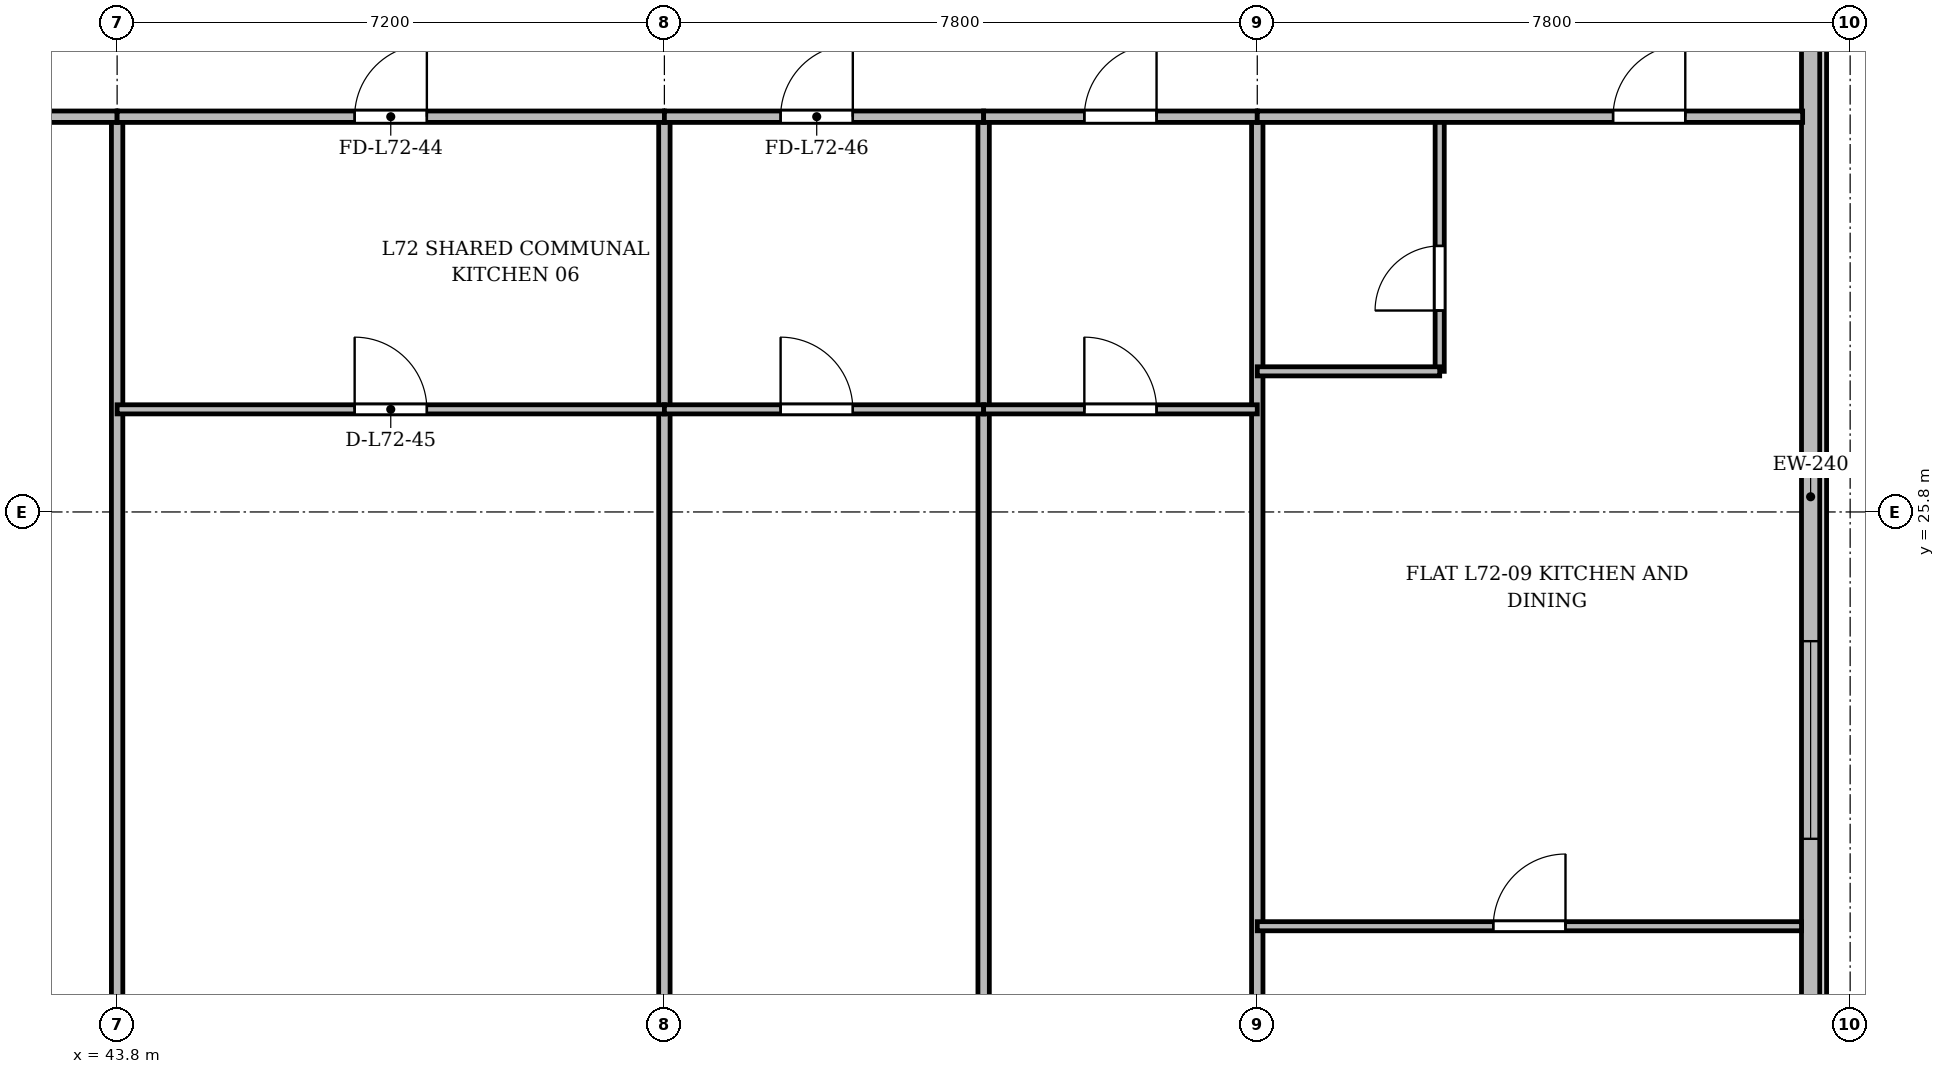
"""IFC4 building model, lengths in metres.
Left out: names, types, materials, properties, quantities, classifications, styles, units other than length and angle.
Written with IfcOpenShell. Run it as: python <this file> out.ifc"""

import sys

from ifc_helpers import new_model, si_unit, direction, frame, frame_2d, origin, place, context, subcontext, project, spatial, rectangle, extrude, source, transform, mapped, element, fill, save


model = new_model("IFC4")
c1 = context("Model", 3, precision=1e-05, world=origin(), true_north=direction((0.0, 1.0)))
c2 = subcontext(c1, "Body", "Model", "MODEL_VIEW")
j1 = project(units=[si_unit("LENGTHUNIT", "METRE"), si_unit("PLANEANGLEUNIT", "RADIAN")], contexts=[c1])
p1 = place(None, origin())
s1 = spatial("IfcSite", under=j1, at=p1, CompositionType="ELEMENT")
p2 = place(p1, origin())
s2 = spatial("IfcBuilding", under=s1, at=p2, CompositionType="ELEMENT")
p3 = place(p2, frame((0.0, 0.0, 277.5)))
s3 = spatial("IfcBuildingStorey", under=s2, at=p3, CompositionType="ELEMENT", Elevation=277.5)
p4 = place(p3, frame((66.08, 45.5, 0.0), z_axis=(0.0, 0.0, 1.0), x_axis=(0.0, -1.0, 0.0)))
e1 = element("IfcWall", 1, at=p4, inside=s3, PredefinedType="SOLIDWALL", context=c2, shape_type="SweptSolid", body=[
    extrude(rectangle(XDim=39.0, YDim=0.24, at=frame_2d((19.5, 0.0))), origin(), (0.0, 0.0, 1.0), 3.37),
])
p5 = place(p4, frame((36.35, 0.0, 0.92)))
e2 = element("IfcOpeningElement", 2, at=p5, cuts=e1, PredefinedType="OPENING", context=c2, shape_type="SweptSolid", body=[
    extrude(rectangle(XDim=1.2, YDim=1.65, at=frame_2d((0.6, 0.825))), frame((0.0, 0.13, 0.0), z_axis=(0.0, -1.0, 0.0), x_axis=(1.0, 0.0, 0.0)), (0.0, 0.0, 1.0), 0.26),
])
p6 = place(p4, frame((32.8, 0.0, 0.92)))
e3 = element("IfcOpeningElement", 3, at=p6, cuts=e1, PredefinedType="OPENING", context=c2, shape_type="SweptSolid", body=[
    extrude(rectangle(XDim=2.6, YDim=1.9, at=frame_2d((1.3, 0.95))), frame((0.0, 0.13, 0.0), z_axis=(0.0, -1.0, 0.0), x_axis=(1.0, 0.0, 0.0)), (0.0, 0.0, 1.0), 0.26),
])
p7 = place(p4, frame((28.6, 0.0, 0.92)))
e4 = element("IfcOpeningElement", 4, at=p7, cuts=e1, PredefinedType="OPENING", context=c2, shape_type="SweptSolid", body=[
    extrude(rectangle(XDim=2.6, YDim=1.9, at=frame_2d((1.3, 0.95))), frame((0.0, 0.13, 0.0), z_axis=(0.0, -1.0, 0.0), x_axis=(1.0, 0.0, 0.0)), (0.0, 0.0, 1.0), 0.26),
])
p8 = place(p4, frame((21.4, 0.0, 0.92)))
e5 = element("IfcOpeningElement", 5, at=p8, cuts=e1, PredefinedType="OPENING", context=c2, shape_type="SweptSolid", body=[
    extrude(rectangle(XDim=2.6, YDim=1.9, at=frame_2d((1.3, 0.95))), frame((0.0, 0.13, 0.0), z_axis=(0.0, -1.0, 0.0), x_axis=(1.0, 0.0, 0.0)), (0.0, 0.0, 1.0), 0.26),
])
p9 = place(p4, frame((7.4, 0.0, 0.92)))
e6 = element("IfcOpeningElement", 6, at=p9, cuts=e1, PredefinedType="OPENING", context=c2, shape_type="SweptSolid", body=[
    extrude(rectangle(XDim=2.6, YDim=1.9, at=frame_2d((1.3, 0.95))), frame((0.0, 0.13, 0.0), z_axis=(0.0, -1.0, 0.0), x_axis=(1.0, 0.0, 0.0)), (0.0, 0.0, 1.0), 0.26),
])
p10 = place(p4, frame((4.5, 0.0, 0.92)))
e7 = element("IfcOpeningElement", 7, at=p10, cuts=e1, PredefinedType="OPENING", context=c2, shape_type="SweptSolid", body=[
    extrude(rectangle(XDim=1.2, YDim=1.65, at=frame_2d((0.6, 0.825))), frame((0.0, 0.13, 0.0), z_axis=(0.0, -1.0, 0.0), x_axis=(1.0, 0.0, 0.0)), (0.0, 0.0, 1.0), 0.26),
])
p11 = place(p4, frame((1.15, 0.0, 0.92)))
e8 = element("IfcOpeningElement", 8, at=p11, cuts=e1, PredefinedType="OPENING", context=c2, shape_type="SweptSolid", body=[
    extrude(rectangle(XDim=1.2, YDim=1.65, at=frame_2d((0.6, 0.825))), frame((0.0, 0.13, 0.0), z_axis=(0.0, -1.0, 0.0), x_axis=(1.0, 0.0, 0.0)), (0.0, 0.0, 1.0), 0.26),
])
for number, where, z_axis, x_axis in (
    (9, (43.8, 3.725, 0.0), (0.0, 0.0, 1.0), (0.0, 1.0, 0.0)),
    (10, (51.0, 3.725, 0.0), (0.0, 0.0, 1.0), (0.0, 1.0, 0.0)),
):
    element("IfcWall", number, at=place(p3, frame(where, z_axis=z_axis, x_axis=x_axis)), inside=s3, PredefinedType="PARTITIONING", context=c2, shape_type="SweptSolid", body=[
        extrude(rectangle(XDim=27.275, YDim=0.15, at=frame_2d((13.637, 0.0))), origin(), (0.0, 0.0, 1.0), 2.87),
    ])
p12 = place(p3, frame((55.2, 3.725, 0.0), z_axis=(0.0, 0.0, 1.0), x_axis=(0.0, 1.0, 0.0)))
e11 = element("IfcWall", 11, at=p12, inside=s3, PredefinedType="PARTITIONING", context=c2, shape_type="SweptSolid", body=[
    extrude(rectangle(XDim=27.275, YDim=0.15, at=frame_2d((13.637, 0.0))), origin(), (0.0, 0.0, 1.0), 2.92),
])
p13 = place(p3, frame((58.8, 3.725, 0.0), z_axis=(0.0, 0.0, 1.0), x_axis=(0.0, 1.0, 0.0)))
e12 = element("IfcWall", 12, at=p13, inside=s3, PredefinedType="PARTITIONING", context=c2, shape_type="SweptSolid", body=[
    extrude(rectangle(XDim=27.275, YDim=0.15, at=frame_2d((13.637, 0.0))), origin(), (0.0, 0.0, 1.0), 2.87),
])
p14 = place(p3, frame((30.6, 31.0, 0.0), z_axis=(0.0, 0.0, 1.0), x_axis=(1.0, 0.0, 0.0)))
e13 = element("IfcWall", 13, at=p14, inside=s3, PredefinedType="PARTITIONING", context=c2, shape_type="SweptSolid", body=[
    extrude(rectangle(XDim=13.2, YDim=0.15, at=frame_2d((6.6, 0.0))), origin(), (0.0, 0.0, 1.0), 2.87),
])
p15 = place(p14, frame((5.8, 0.0, 0.0)))
e14 = element("IfcOpeningElement", 14, at=p15, cuts=e13, PredefinedType="OPENING", context=c2, shape_type="SweptSolid", body=[
    extrude(rectangle(XDim=1.6, YDim=2.2, at=frame_2d((0.8, 1.1))), frame((0.0, 0.085, 0.0), z_axis=(0.0, -1.0, 0.0), x_axis=(1.0, 0.0, 0.0)), (0.0, 0.0, 1.0), 0.17),
])
p16 = place(p3, frame((43.8, 31.0, 0.0), z_axis=(0.0, 0.0, 1.0), x_axis=(1.0, 0.0, 0.0)))
e15 = element("IfcWall", 15, at=p16, inside=s3, PredefinedType="PARTITIONING", context=c2, shape_type="SweptSolid", body=[
    extrude(rectangle(XDim=7.2, YDim=0.15, at=frame_2d((3.6, 0.0))), origin(), (0.0, 0.0, 1.0), 2.87),
])
p17 = place(p16, frame((3.125, 0.0, 0.0)))
e16 = element("IfcOpeningElement", 16, at=p17, cuts=e15, PredefinedType="OPENING", context=c2, shape_type="SweptSolid", body=[
    extrude(rectangle(XDim=0.95, YDim=2.15, at=frame_2d((0.475, 1.075))), frame((0.0, 0.085, 0.0), z_axis=(0.0, -1.0, 0.0), x_axis=(1.0, 0.0, 0.0)), (0.0, 0.0, 1.0), 0.17),
])
p18 = place(p3, frame((43.8, 27.15, 0.0), z_axis=(0.0, 0.0, 1.0), x_axis=(1.0, 0.0, 0.0)))
e17 = element("IfcWall", 17, at=p18, inside=s3, PredefinedType="PARTITIONING", context=c2, shape_type="SweptSolid", body=[
    extrude(rectangle(XDim=7.2, YDim=0.12, at=frame_2d((3.6, 0.0))), origin(), (0.0, 0.0, 1.0), 2.87),
])
p19 = place(p18, frame((3.125, 0.0, 0.0)))
e18 = element("IfcOpeningElement", 18, at=p19, cuts=e17, PredefinedType="OPENING", context=c2, shape_type="SweptSolid", body=[
    extrude(rectangle(XDim=0.95, YDim=2.15, at=frame_2d((0.475, 1.075))), frame((0.0, 0.07, 0.0), z_axis=(0.0, -1.0, 0.0), x_axis=(1.0, 0.0, 0.0)), (0.0, 0.0, 1.0), 0.14),
])
p20 = place(p3, frame((51.0, 31.0, 0.0), z_axis=(0.0, 0.0, 1.0), x_axis=(1.0, 0.0, 0.0)))
e19 = element("IfcWall", 19, at=p20, inside=s3, PredefinedType="PARTITIONING", context=c2, shape_type="SweptSolid", body=[
    extrude(rectangle(XDim=4.2, YDim=0.15, at=frame_2d((2.1, 0.0))), origin(), (0.0, 0.0, 1.0), 2.87),
])
p21 = place(p20, frame((1.529, 0.0, 0.0)))
e20 = element("IfcOpeningElement", 20, at=p21, cuts=e19, PredefinedType="OPENING", context=c2, shape_type="SweptSolid", body=[
    extrude(rectangle(XDim=0.95, YDim=2.15, at=frame_2d((0.475, 1.075))), frame((0.0, 0.085, 0.0), z_axis=(0.0, -1.0, 0.0), x_axis=(1.0, 0.0, 0.0)), (0.0, 0.0, 1.0), 0.17),
])
p22 = place(p3, frame((51.0, 27.15, 0.0), z_axis=(0.0, 0.0, 1.0), x_axis=(1.0, 0.0, 0.0)))
e21 = element("IfcWall", 21, at=p22, inside=s3, PredefinedType="PARTITIONING", context=c2, shape_type="SweptSolid", body=[
    extrude(rectangle(XDim=4.2, YDim=0.12, at=frame_2d((2.1, 0.0))), origin(), (0.0, 0.0, 1.0), 2.87),
])
p23 = place(p22, frame((1.529, 0.0, 0.0)))
e22 = element("IfcOpeningElement", 22, at=p23, cuts=e21, PredefinedType="OPENING", context=c2, shape_type="SweptSolid", body=[
    extrude(rectangle(XDim=0.95, YDim=2.15, at=frame_2d((0.475, 1.075))), frame((0.0, 0.07, 0.0), z_axis=(0.0, -1.0, 0.0), x_axis=(1.0, 0.0, 0.0)), (0.0, 0.0, 1.0), 0.14),
])
p24 = place(p3, frame((55.2, 31.0, 0.0), z_axis=(0.0, 0.0, 1.0), x_axis=(1.0, 0.0, 0.0)))
e23 = element("IfcWall", 23, at=p24, inside=s3, PredefinedType="PARTITIONING", context=c2, shape_type="SweptSolid", body=[
    extrude(rectangle(XDim=3.6, YDim=0.15, at=frame_2d((1.8, 0.0))), origin(), (0.0, 0.0, 1.0), 2.87),
])
p25 = place(p24, frame((1.325, 0.0, 0.0)))
e24 = element("IfcOpeningElement", 24, at=p25, cuts=e23, PredefinedType="OPENING", context=c2, shape_type="SweptSolid", body=[
    extrude(rectangle(XDim=0.95, YDim=2.15, at=frame_2d((0.475, 1.075))), frame((0.0, 0.085, 0.0), z_axis=(0.0, -1.0, 0.0), x_axis=(1.0, 0.0, 0.0)), (0.0, 0.0, 1.0), 0.17),
])
p26 = place(p3, frame((55.2, 27.15, 0.0), z_axis=(0.0, 0.0, 1.0), x_axis=(1.0, 0.0, 0.0)))
e25 = element("IfcWall", 25, at=p26, inside=s3, PredefinedType="PARTITIONING", context=c2, shape_type="SweptSolid", body=[
    extrude(rectangle(XDim=3.6, YDim=0.12, at=frame_2d((1.8, 0.0))), origin(), (0.0, 0.0, 1.0), 2.87),
])
p27 = place(p26, frame((1.325, 0.0, 0.0)))
e26 = element("IfcOpeningElement", 26, at=p27, cuts=e25, PredefinedType="OPENING", context=c2, shape_type="SweptSolid", body=[
    extrude(rectangle(XDim=0.95, YDim=2.15, at=frame_2d((0.475, 1.075))), frame((0.0, 0.07, 0.0), z_axis=(0.0, -1.0, 0.0), x_axis=(1.0, 0.0, 0.0)), (0.0, 0.0, 1.0), 0.14),
])
p28 = place(p3, frame((58.8, 20.35, 0.0), z_axis=(0.0, 0.0, 1.0), x_axis=(1.0, 0.0, 0.0)))
e27 = element("IfcWall", 27, at=p28, inside=s3, PredefinedType="PARTITIONING", context=c2, shape_type="SweptSolid", body=[
    extrude(rectangle(XDim=7.16, YDim=0.12, at=frame_2d((3.58, 0.0))), origin(), (0.0, 0.0, 1.0), 2.87),
])
p29 = place(p28, frame((3.105, 0.0, 0.0)))
e28 = element("IfcOpeningElement", 28, at=p29, cuts=e27, PredefinedType="OPENING", context=c2, shape_type="SweptSolid", body=[
    extrude(rectangle(XDim=0.95, YDim=2.15, at=frame_2d((0.475, 1.075))), frame((0.0, 0.07, 0.0), z_axis=(0.0, -1.0, 0.0), x_axis=(1.0, 0.0, 0.0)), (0.0, 0.0, 1.0), 0.14),
])
p30 = place(p3, frame((61.2, 27.65, 0.0), z_axis=(0.0, 0.0, 1.0), x_axis=(0.0, 1.0, 0.0)))
e29 = element("IfcWall", 29, at=p30, inside=s3, PredefinedType="PARTITIONING", context=c2, shape_type="SweptSolid", body=[
    extrude(rectangle(XDim=3.35, YDim=0.12, at=frame_2d((1.675, 0.0))), origin(), (0.0, 0.0, 1.0), 3.37),
])
p31 = place(p30, frame((0.8, 0.0, 0.0)))
e30 = element("IfcOpeningElement", 30, at=p31, cuts=e29, PredefinedType="OPENING", context=c2, shape_type="SweptSolid", body=[
    extrude(rectangle(XDim=0.85, YDim=2.1, at=frame_2d((0.425, 1.05))), frame((0.0, 0.07, 0.0), z_axis=(0.0, -1.0, 0.0), x_axis=(1.0, 0.0, 0.0)), (0.0, 0.0, 1.0), 0.14),
])
p32 = place(p3, frame((58.8, 27.65, 0.0), z_axis=(0.0, 0.0, 1.0), x_axis=(1.0, 0.0, 0.0)))
e31 = element("IfcWall", 31, at=p32, inside=s3, PredefinedType="PARTITIONING", context=c2, shape_type="SweptSolid", body=[
    extrude(rectangle(XDim=2.4, YDim=0.12, at=frame_2d((1.2, 0.0))), origin(), (0.0, 0.0, 1.0), 2.87),
])
p33 = place(p3, frame((58.8, 31.0, 0.0), z_axis=(0.0, 0.0, 1.0), x_axis=(1.0, 0.0, 0.0)))
e32 = element("IfcWall", 32, at=p33, inside=s3, PredefinedType="PARTITIONING", context=c2, shape_type="SweptSolid", body=[
    extrude(rectangle(XDim=7.175, YDim=0.15, at=frame_2d((3.587, 0.0))), origin(), (0.0, 0.0, 1.0), 2.87),
])
p34 = place(p33, frame((4.681, 0.0, 0.0)))
e33 = element("IfcOpeningElement", 33, at=p34, cuts=e32, PredefinedType="OPENING", context=c2, shape_type="SweptSolid", body=[
    extrude(rectangle(XDim=0.95, YDim=2.15, at=frame_2d((0.475, 1.075))), frame((0.0, 0.085, 0.0), z_axis=(0.0, -1.0, 0.0), x_axis=(1.0, 0.0, 0.0)), (0.0, 0.0, 1.0), 0.17),
])
m1 = source(origin(), c2, "Body", "SweptSolid", [
    extrude(rectangle(XDim=2.6, YDim=1.9, at=frame_2d((1.3, 0.95))), frame((0.0, 0.03, 0.0), z_axis=(0.0, -1.0, 0.0), x_axis=(1.0, 0.0, 0.0)), (0.0, 0.0, 1.0), 0.06),
])
p35 = place(p8, origin())
e34 = element("IfcWindow", 34, at=p35, inside=s3, PartitioningType="SINGLE_PANEL", PredefinedType="WINDOW", context=c2, shape_type="MappedRepresentation", body=[
    mapped(m1, transform((0.0, 0.0, 0.0), x_axis=(1.0, 0.0, 0.0), y_axis=(0.0, 1.0, 0.0), z_axis=(0.0, 0.0, 1.0), scale=1.0)),
])
fill(e5, e34)
m2 = source(origin(), c2, "Body", "SweptSolid", [
    extrude(rectangle(XDim=0.95, YDim=2.15, at=frame_2d((0.475, 1.075))), frame((0.0, 0.025, 0.0), z_axis=(0.0, -1.0, 0.0), x_axis=(1.0, 0.0, 0.0)), (0.0, 0.0, 1.0), 0.05),
])
p36 = place(p17, origin())
e35 = element("IfcDoor", 35, at=p36, inside=s3, OperationType="SINGLE_SWING_RIGHT", PredefinedType="DOOR", context=c2, shape_type="MappedRepresentation", body=[
    mapped(m2, transform((0.0, 0.0, 0.0), x_axis=(1.0, 0.0, 0.0), y_axis=(0.0, 1.0, 0.0), z_axis=(0.0, 0.0, 1.0), scale=1.0)),
])
fill(e16, e35)
p37 = place(p19, origin())
e36 = element("IfcDoor", 36, at=p37, inside=s3, OperationType="SINGLE_SWING_LEFT", PredefinedType="DOOR", context=c2, shape_type="MappedRepresentation", body=[
    mapped(m2, transform((0.0, 0.0, 0.0), x_axis=(1.0, 0.0, 0.0), y_axis=(0.0, 1.0, 0.0), z_axis=(0.0, 0.0, 1.0), scale=1.0)),
])
fill(e18, e36)
p38 = place(p21, origin())
e37 = element("IfcDoor", 37, at=p38, inside=s3, OperationType="SINGLE_SWING_RIGHT", PredefinedType="DOOR", context=c2, shape_type="MappedRepresentation", body=[
    mapped(m2, transform((0.0, 0.0, 0.0), x_axis=(1.0, 0.0, 0.0), y_axis=(0.0, 1.0, 0.0), z_axis=(0.0, 0.0, 1.0), scale=1.0)),
])
fill(e20, e37)
p39 = place(p23, origin())
e38 = element("IfcDoor", 38, at=p39, inside=s3, OperationType="SINGLE_SWING_LEFT", PredefinedType="DOOR", context=c2, shape_type="MappedRepresentation", body=[
    mapped(m2, transform((0.0, 0.0, 0.0), x_axis=(1.0, 0.0, 0.0), y_axis=(0.0, 1.0, 0.0), z_axis=(0.0, 0.0, 1.0), scale=1.0)),
])
fill(e22, e38)
p40 = place(p25, origin())
e39 = element("IfcDoor", 39, at=p40, inside=s3, OperationType="SINGLE_SWING_RIGHT", PredefinedType="DOOR", context=c2, shape_type="MappedRepresentation", body=[
    mapped(m2, transform((0.0, 0.0, 0.0), x_axis=(1.0, 0.0, 0.0), y_axis=(0.0, 1.0, 0.0), z_axis=(0.0, 0.0, 1.0), scale=1.0)),
])
fill(e24, e39)
p41 = place(p27, origin())
e40 = element("IfcDoor", 40, at=p41, inside=s3, OperationType="SINGLE_SWING_LEFT", PredefinedType="DOOR", context=c2, shape_type="MappedRepresentation", body=[
    mapped(m2, transform((0.0, 0.0, 0.0), x_axis=(1.0, 0.0, 0.0), y_axis=(0.0, 1.0, 0.0), z_axis=(0.0, 0.0, 1.0), scale=1.0)),
])
fill(e26, e40)
p42 = place(p29, origin())
e41 = element("IfcDoor", 41, at=p42, inside=s3, OperationType="SINGLE_SWING_RIGHT", PredefinedType="DOOR", context=c2, shape_type="MappedRepresentation", body=[
    mapped(m2, transform((0.0, 0.0, 0.0), x_axis=(1.0, 0.0, 0.0), y_axis=(0.0, 1.0, 0.0), z_axis=(0.0, 0.0, 1.0), scale=1.0)),
])
fill(e28, e41)
m3 = source(origin(), c2, "Body", "SweptSolid", [
    extrude(rectangle(XDim=0.85, YDim=2.1, at=frame_2d((0.425, 1.05))), frame((0.0, 0.025, 0.0), z_axis=(0.0, -1.0, 0.0), x_axis=(1.0, 0.0, 0.0)), (0.0, 0.0, 1.0), 0.05),
])
p43 = place(p31, origin())
e42 = element("IfcDoor", 42, at=p43, inside=s3, OperationType="SINGLE_SWING_LEFT", PredefinedType="DOOR", context=c2, shape_type="MappedRepresentation", body=[
    mapped(m3, transform((0.0, 0.0, 0.0), x_axis=(1.0, 0.0, 0.0), y_axis=(0.0, 1.0, 0.0), z_axis=(0.0, 0.0, 1.0), scale=1.0)),
])
fill(e30, e42)
p44 = place(p34, origin())
e43 = element("IfcDoor", 43, at=p44, inside=s3, OperationType="SINGLE_SWING_RIGHT", PredefinedType="DOOR", context=c2, shape_type="MappedRepresentation", body=[
    mapped(m2, transform((0.0, 0.0, 0.0), x_axis=(1.0, 0.0, 0.0), y_axis=(0.0, 1.0, 0.0), z_axis=(0.0, 0.0, 1.0), scale=1.0)),
])
fill(e33, e43)
save(model, sys.argv[1])
